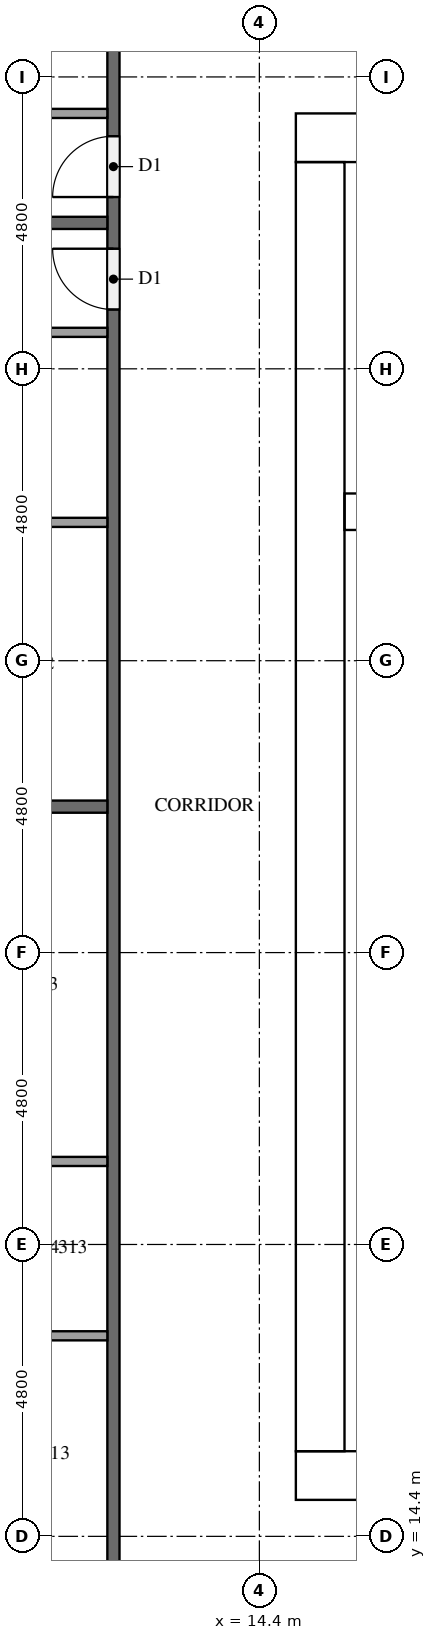
"""IFC4 building model, lengths in metres.
Left out: names, types, materials, properties, quantities, classifications, styles, units other than length and angle.
Written with IfcOpenShell. Run it as: python <this file> out.ifc"""

import sys

from ifc_helpers import new_model, si_unit, direction, frame, frame_2d, origin, place, context, subcontext, project, spatial, rectangle, extrude, element, fill, save


model = new_model("IFC4")
c1 = context("Model", 3, precision=1e-05, world=origin(), true_north=direction((0.0, 1.0)))
c2 = subcontext(c1, "Body", "Model", "MODEL_VIEW")
j1 = project(units=[si_unit("LENGTHUNIT", "METRE"), si_unit("PLANEANGLEUNIT", "RADIAN")], contexts=[c1])
p1 = place(None, origin())
s1 = spatial("IfcSite", under=j1, at=p1, CompositionType="ELEMENT")
p2 = place(p1, origin())
s2 = spatial("IfcBuilding", under=s1, at=p2, CompositionType="ELEMENT")
p3 = place(p2, frame((0.0, 0.0, 166.5)))
s3 = spatial("IfcBuildingStorey", under=s2, at=p3, CompositionType="ELEMENT", Elevation=166.5)
p4 = place(p3, frame((15.0, 15.4, 0.0), z_axis=(0.0, 0.0, 1.0), x_axis=(1.0, 0.0, 0.0)))
e1 = element("IfcWall", 1, at=p4, inside=s3, PredefinedType="SHEAR", context=c2, shape_type="SweptSolid", body=[
    extrude(rectangle(XDim=32.4, YDim=0.8, at=frame_2d((16.2, 0.0))), origin(), (0.0, 0.0, 1.0), 3.2),
])
p5 = place(p4, frame((15.3, 0.0, 0.0)))
e2 = element("IfcOpeningElement", 2, at=p5, cuts=e1, PredefinedType="OPENING", context=c2, shape_type="SweptSolid", body=[
    extrude(rectangle(XDim=1.8, YDim=2.1, at=frame_2d((0.9, 1.05))), frame((0.0, 0.41, 0.0), z_axis=(0.0, -1.0, 0.0), x_axis=(1.0, 0.0, 0.0)), (0.0, 0.0, 1.0), 0.82),
])
p6 = place(p3, frame((15.0, 37.4, 0.0), z_axis=(0.0, 0.0, 1.0), x_axis=(1.0, 0.0, 0.0)))
e3 = element("IfcWall", 3, at=p6, inside=s3, PredefinedType="SHEAR", context=c2, shape_type="SweptSolid", body=[
    extrude(rectangle(XDim=32.4, YDim=0.8, at=frame_2d((16.2, 0.0))), origin(), (0.0, 0.0, 1.0), 3.2),
])
p7 = place(p6, frame((15.3, 0.0, 0.0)))
e4 = element("IfcOpeningElement", 4, at=p7, cuts=e3, PredefinedType="OPENING", context=c2, shape_type="SweptSolid", body=[
    extrude(rectangle(XDim=1.8, YDim=2.1, at=frame_2d((0.9, 1.05))), frame((0.0, 0.41, 0.0), z_axis=(0.0, -1.0, 0.0), x_axis=(1.0, 0.0, 0.0)), (0.0, 0.0, 1.0), 0.82),
])
p8 = place(p6, frame((1.51, 0.0, 0.0)))
e5 = element("IfcOpeningElement", 5, at=p8, cuts=e3, PredefinedType="OPENING", context=c2, shape_type="SweptSolid", body=[
    extrude(rectangle(XDim=1.0, YDim=2.1, at=frame_2d((0.5, 1.05))), frame((0.0, 0.41, 0.0), z_axis=(0.0, -1.0, 0.0), x_axis=(1.0, 0.0, 0.0)), (0.0, 0.0, 1.0), 0.82),
])
p9 = place(p6, frame((5.11, 0.0, 0.0)))
e6 = element("IfcOpeningElement", 6, at=p9, cuts=e3, PredefinedType="OPENING", context=c2, shape_type="SweptSolid", body=[
    extrude(rectangle(XDim=1.0, YDim=2.1, at=frame_2d((0.5, 1.05))), frame((0.0, 0.41, 0.0), z_axis=(0.0, -1.0, 0.0), x_axis=(1.0, 0.0, 0.0)), (0.0, 0.0, 1.0), 0.82),
])
p10 = place(p3, frame((15.4, 15.8, 0.0), z_axis=(0.0, 0.0, 1.0), x_axis=(0.0, 1.0, 0.0)))
e7 = element("IfcWall", 7, at=p10, inside=s3, PredefinedType="SHEAR", context=c2, shape_type="SweptSolid", body=[
    extrude(rectangle(XDim=21.2, YDim=0.8, at=frame_2d((10.6, 0.0))), origin(), (0.0, 0.0, 1.0), 3.2),
])
p11 = place(p10, frame((4.96, 0.0, 0.0)))
e8 = element("IfcOpeningElement", 8, at=p11, cuts=e7, PredefinedType="OPENING", context=c2, shape_type="SweptSolid", body=[
    extrude(rectangle(XDim=1.2, YDim=2.1, at=frame_2d((0.6, 1.05))), frame((0.0, 0.41, 0.0), z_axis=(0.0, -1.0, 0.0), x_axis=(1.0, 0.0, 0.0)), (0.0, 0.0, 1.0), 0.82),
])
p12 = place(p3, frame((15.8, 31.25, 0.0), z_axis=(0.0, 0.0, 1.0), x_axis=(1.0, 0.0, 0.0)))
e9 = element("IfcWall", 9, at=p12, inside=s3, PredefinedType="SHEAR", context=c2, shape_type="SweptSolid", body=[
    extrude(rectangle(XDim=7.0, YDim=0.6, at=frame_2d((3.5, 0.0))), origin(), (0.0, 0.0, 1.0), 3.2),
])
p13 = place(p3, frame((12.0, 12.1, 0.0), z_axis=(0.0, 0.0, 1.0), x_axis=(0.0, 1.0, 0.0)))
e10 = element("IfcWall", 10, at=p13, inside=s3, PredefinedType="PARTITIONING", context=c2, shape_type="SweptSolid", body=[
    extrude(rectangle(XDim=28.6, YDim=0.2, at=frame_2d((14.3, 0.0))), origin(), (0.0, 0.0, 1.0), 3.2),
])
p14 = place(p13, frame((24.325, 0.0, 0.0)))
e11 = element("IfcOpeningElement", 11, at=p14, cuts=e10, PredefinedType="OPENING", context=c2, shape_type="SweptSolid", body=[
    extrude(rectangle(XDim=1.0, YDim=2.1, at=frame_2d((0.5, 1.05))), frame((0.0, 0.11, 0.0), z_axis=(0.0, -1.0, 0.0), x_axis=(1.0, 0.0, 0.0)), (0.0, 0.0, 1.0), 0.22),
])
p15 = place(p13, frame((22.475, 0.0, 0.0)))
e12 = element("IfcOpeningElement", 12, at=p15, cuts=e10, PredefinedType="OPENING", context=c2, shape_type="SweptSolid", body=[
    extrude(rectangle(XDim=1.0, YDim=2.1, at=frame_2d((0.5, 1.05))), frame((0.0, 0.11, 0.0), z_axis=(0.0, -1.0, 0.0), x_axis=(1.0, 0.0, 0.0)), (0.0, 0.0, 1.0), 0.22),
])
p16 = place(p13, frame((0.325, 0.0, 0.0)))
e13 = element("IfcOpeningElement", 13, at=p16, cuts=e10, PredefinedType="OPENING", context=c2, shape_type="SweptSolid", body=[
    extrude(rectangle(XDim=1.0, YDim=2.1, at=frame_2d((0.5, 1.05))), frame((0.0, 0.11, 0.0), z_axis=(0.0, -1.0, 0.0), x_axis=(1.0, 0.0, 0.0)), (0.0, 0.0, 1.0), 0.22),
])
for number, where, z_axis, x_axis in (
    (14, (0.1, 36.0, 0.0), (0.0, 0.0, 1.0), (1.0, 0.0, 0.0)),
    (15, (0.1, 26.4, 0.0), (0.0, 0.0, 1.0), (1.0, 0.0, 0.0)),
):
    element("IfcWall", number, at=place(p3, frame(where, z_axis=z_axis, x_axis=x_axis)), inside=s3, PredefinedType="PARTITIONING", context=c2, shape_type="SweptSolid", body=[
        extrude(rectangle(XDim=11.8, YDim=0.2, at=frame_2d((5.9, 0.0))), origin(), (0.0, 0.0, 1.0), 3.2),
    ])
p17 = place(p3, frame((11.9, 37.8, 0.0), z_axis=(0.0, 0.0, 1.0), x_axis=(-1.0, 0.0, 0.0)))
e16 = element("IfcWall", 16, at=p17, inside=s3, PredefinedType="PARTITIONING", context=c2, shape_type="SweptSolid", body=[
    extrude(rectangle(XDim=3.125, YDim=0.15, at=frame_2d((1.562, 0.0))), origin(), (0.0, 0.0, 1.0), 3.2),
])
p18 = place(p3, frame((11.9, 31.075, 0.0), z_axis=(0.0, 0.0, 1.0), x_axis=(-1.0, 0.0, 0.0)))
e17 = element("IfcWall", 17, at=p18, inside=s3, PredefinedType="PARTITIONING", context=c2, shape_type="SweptSolid", body=[
    extrude(rectangle(XDim=3.875, YDim=0.15, at=frame_2d((1.938, 0.0))), origin(), (0.0, 0.0, 1.0), 3.2),
])
p19 = place(p3, frame((11.9, 34.2, 0.0), z_axis=(0.0, 0.0, 1.0), x_axis=(-1.0, 0.0, 0.0)))
e18 = element("IfcWall", 18, at=p19, inside=s3, PredefinedType="PARTITIONING", context=c2, shape_type="SweptSolid", body=[
    extrude(rectangle(XDim=4.025, YDim=0.15, at=frame_2d((2.012, 0.0))), origin(), (0.0, 0.0, 1.0), 3.2),
])
for number, where, z_axis, x_axis in (
    (19, (11.9, 17.698, 0.0), (0.0, 0.0, 1.0), (-1.0, 0.0, 0.0)),
    (20, (11.9, 20.565, 0.0), (0.0, 0.0, 1.0), (-1.0, 0.0, 0.0)),
):
    element("IfcWall", number, at=place(p3, frame(where, z_axis=z_axis, x_axis=x_axis)), inside=s3, PredefinedType="PARTITIONING", context=c2, shape_type="SweptSolid", body=[
        extrude(rectangle(XDim=3.725, YDim=0.15, at=frame_2d((1.862, 0.0))), origin(), (0.0, 0.0, 1.0), 3.2),
    ])
p20 = place(p11, frame((1.2, 0.0, 0.0), z_axis=(0.0, 0.0, 1.0), x_axis=(-1.0, 0.0, 0.0)))
e21 = element("IfcDoor", 21, at=p20, inside=s3, OperationType="SINGLE_SWING_RIGHT", PredefinedType="DOOR", context=c2, shape_type="SweptSolid", body=[
    extrude(rectangle(XDim=1.2, YDim=2.1, at=frame_2d((0.6, 1.05))), frame((0.0, 0.025, 0.0), z_axis=(0.0, -1.0, 0.0), x_axis=(1.0, 0.0, 0.0)), (0.0, 0.0, 1.0), 0.05),
])
fill(e8, e21)
p21 = place(p14, origin())
e22 = element("IfcDoor", 22, at=p21, inside=s3, OperationType="SINGLE_SWING_LEFT", PredefinedType="DOOR", context=c2, shape_type="SweptSolid", body=[
    extrude(rectangle(XDim=1.0, YDim=2.1, at=frame_2d((0.5, 1.05))), frame((0.0, 0.025, 0.0), z_axis=(0.0, -1.0, 0.0), x_axis=(1.0, 0.0, 0.0)), (0.0, 0.0, 1.0), 0.05),
])
fill(e11, e22)
p22 = place(p15, origin())
e23 = element("IfcDoor", 23, at=p22, inside=s3, OperationType="SINGLE_SWING_RIGHT", PredefinedType="DOOR", context=c2, shape_type="SweptSolid", body=[
    extrude(rectangle(XDim=1.0, YDim=2.1, at=frame_2d((0.5, 1.05))), frame((0.0, 0.025, 0.0), z_axis=(0.0, -1.0, 0.0), x_axis=(1.0, 0.0, 0.0)), (0.0, 0.0, 1.0), 0.05),
])
fill(e12, e23)
save(model, sys.argv[1])
